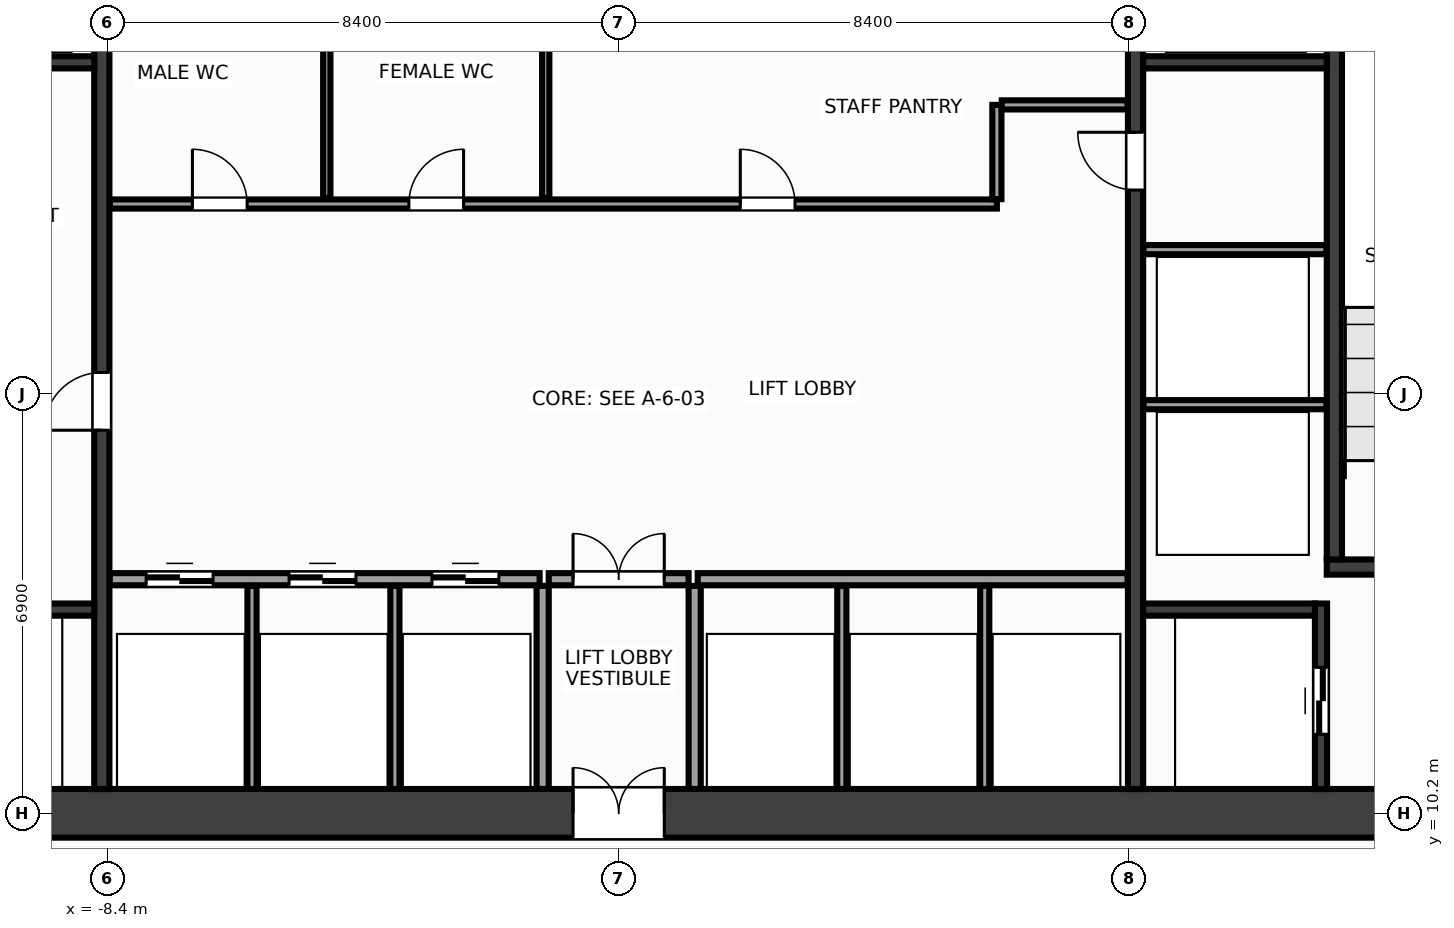
"""IFC4 building model, lengths in metres.
Left out: names, types, materials, properties, quantities, classifications, styles, units other than length and angle.
Written with IfcOpenShell. Run it as: python <this file> out.ifc"""

import sys

from ifc_helpers import new_model, si_unit, direction, frame, frame_2d, origin, place, context, subcontext, project, spatial, rectangle, extrude, source, transform, mapped, element, fill, save


model = new_model("IFC4")
c1 = context("Model", 3, precision=1e-05, world=origin(), true_north=direction((0.0, 1.0)))
c2 = subcontext(c1, "Body", "Model", "MODEL_VIEW")
j1 = project(units=[si_unit("LENGTHUNIT", "METRE"), si_unit("PLANEANGLEUNIT", "RADIAN")], contexts=[c1])
p1 = place(None, origin())
s1 = spatial("IfcSite", under=j1, at=p1, CompositionType="ELEMENT")
p2 = place(p1, origin())
s2 = spatial("IfcBuilding", under=s1, at=p2, CompositionType="ELEMENT")
p3 = place(p2, frame((0.0, 0.0, 27.2)))
s3 = spatial("IfcBuildingStorey", under=s2, at=p3, CompositionType="ELEMENT", Elevation=27.2)
m1 = source(origin(), c2, "Body", "SweptSolid", [
    extrude(rectangle(XDim=32.0, YDim=0.8, at=frame_2d((16.0, 0.0))), origin(), (0.0, 0.0, 1.0), 3.6),
])
p4 = place(p3, frame((-16.0, 10.2, 0.0), z_axis=(0.0, 0.0, 1.0), x_axis=(1.0, 0.0, 0.0)))
e1 = element("IfcWall", 1, at=p4, inside=s3, PredefinedType="SHEAR", context=c2, shape_type="MappedRepresentation", body=[
    mapped(m1, transform((0.0, 0.0, 0.0), x_axis=(1.0, 0.0, 0.0), y_axis=(0.0, 1.0, 0.0), z_axis=(0.0, 0.0, 1.0), scale=1.0)),
])
p5 = place(p4, frame((1.85, 0.0, 0.0)))
e2 = element("IfcOpeningElement", 2, at=p5, cuts=e1, PredefinedType="OPENING", context=c2, shape_type="SweptSolid", body=[
    extrude(rectangle(XDim=1.6, YDim=2.15, at=frame_2d((0.8, 1.075))), frame((0.0, 0.412, 0.0), z_axis=(0.0, -1.0, 0.0), x_axis=(1.0, 0.0, 0.0)), (0.0, 0.0, 1.0), 0.824),
])
p6 = place(p4, frame((28.55, 0.0, 0.0)))
e3 = element("IfcOpeningElement", 3, at=p6, cuts=e1, PredefinedType="OPENING", context=c2, shape_type="SweptSolid", body=[
    extrude(rectangle(XDim=1.6, YDim=2.15, at=frame_2d((0.8, 1.075))), frame((0.0, 0.412, 0.0), z_axis=(0.0, -1.0, 0.0), x_axis=(1.0, 0.0, 0.0)), (0.0, 0.0, 1.0), 0.824),
])
p7 = place(p4, frame((15.25, 0.0, 0.0)))
e4 = element("IfcOpeningElement", 4, at=p7, cuts=e1, PredefinedType="OPENING", context=c2, shape_type="SweptSolid", body=[
    extrude(rectangle(XDim=1.5, YDim=2.2, at=frame_2d((0.75, 1.1))), frame((0.0, 0.412, 0.0), z_axis=(0.0, -1.0, 0.0), x_axis=(1.0, 0.0, 0.0)), (0.0, 0.0, 1.0), 0.824),
])
m2 = source(origin(), c2, "Body", "SweptSolid", [
    extrude(rectangle(XDim=12.8, YDim=0.25, at=frame_2d((6.4, 0.0))), origin(), (0.0, 0.0, 1.0), 3.6),
])
p8 = place(p3, frame((-8.5, 10.6, 0.0), z_axis=(0.0, 0.0, 1.0), x_axis=(0.0, 1.0, 0.0)))
e5 = element("IfcWall", 5, at=p8, inside=s3, PredefinedType="SHEAR", context=c2, shape_type="MappedRepresentation", body=[
    mapped(m2, transform((0.0, 0.0, 0.0), x_axis=(1.0, 0.0, 0.0), y_axis=(0.0, 1.0, 0.0), z_axis=(0.0, 0.0, 1.0), scale=1.0)),
])
p9 = place(p8, frame((5.9, 0.0, 0.0)))
e6 = element("IfcOpeningElement", 6, at=p9, cuts=e5, PredefinedType="OPENING", context=c2, shape_type="SweptSolid", body=[
    extrude(rectangle(XDim=0.95, YDim=2.15, at=frame_2d((0.475, 1.075))), frame((0.0, 0.137, 0.0), z_axis=(0.0, -1.0, 0.0), x_axis=(1.0, 0.0, 0.0)), (0.0, 0.0, 1.0), 0.274),
])
p10 = place(p3, frame((8.5, 10.6, 0.0), z_axis=(0.0, 0.0, 1.0), x_axis=(0.0, 1.0, 0.0)))
e7 = element("IfcWall", 7, at=p10, inside=s3, PredefinedType="SHEAR", context=c2, shape_type="MappedRepresentation", body=[
    mapped(m2, transform((0.0, 0.0, 0.0), x_axis=(1.0, 0.0, 0.0), y_axis=(0.0, 1.0, 0.0), z_axis=(0.0, 0.0, 1.0), scale=1.0)),
])
p11 = place(p10, frame((9.85, 0.0, 0.0)))
e8 = element("IfcOpeningElement", 8, at=p11, cuts=e7, PredefinedType="OPENING", context=c2, shape_type="SweptSolid", body=[
    extrude(rectangle(XDim=0.95, YDim=2.15, at=frame_2d((0.475, 1.075))), frame((0.0, 0.137, 0.0), z_axis=(0.0, -1.0, 0.0), x_axis=(1.0, 0.0, 0.0)), (0.0, 0.0, 1.0), 0.274),
])
m3 = source(origin(), c2, "Body", "SweptSolid", [
    extrude(rectangle(XDim=3.555, YDim=0.25, at=frame_2d((1.777, 0.0))), origin(), (0.0, 0.0, 1.0), 3.6),
])
p12 = place(p3, frame((11.645, 14.25, 0.0), z_axis=(0.0, 0.0, 1.0), x_axis=(1.0, 0.0, 0.0)))
e9 = element("IfcWall", 9, at=p12, inside=s3, PredefinedType="SHEAR", context=c2, shape_type="MappedRepresentation", body=[
    mapped(m3, transform((0.0, 0.0, 0.0), x_axis=(1.0, 0.0, 0.0), y_axis=(0.0, 1.0, 0.0), z_axis=(0.0, 0.0, 1.0), scale=1.0)),
])
p13 = place(p12, frame((0.95, 0.0, 0.0)))
e10 = element("IfcOpeningElement", 10, at=p13, cuts=e9, PredefinedType="OPENING", context=c2, shape_type="SweptSolid", body=[
    extrude(rectangle(XDim=1.6, YDim=2.15, at=frame_2d((0.8, 1.075))), frame((0.0, 0.137, 0.0), z_axis=(0.0, -1.0, 0.0), x_axis=(1.0, 0.0, 0.0)), (0.0, 0.0, 1.0), 0.274),
])
m4 = source(origin(), c2, "Body", "SweptSolid", [
    extrude(rectangle(XDim=9.025, YDim=0.25, at=frame_2d((4.512, 0.0))), origin(), (0.0, 0.0, 1.0), 3.6),
])
p14 = place(p3, frame((11.77, 14.375, 0.0), z_axis=(0.0, 0.0, 1.0), x_axis=(0.0, 1.0, 0.0)))
e11 = element("IfcWall", 11, at=p14, inside=s3, PredefinedType="SHEAR", context=c2, shape_type="MappedRepresentation", body=[
    mapped(m4, transform((0.0, 0.0, 0.0), x_axis=(1.0, 0.0, 0.0), y_axis=(0.0, 1.0, 0.0), z_axis=(0.0, 0.0, 1.0), scale=1.0)),
])
m5 = source(origin(), c2, "Body", "SweptSolid", [
    extrude(rectangle(XDim=2.825, YDim=0.2, at=frame_2d((1.413, 0.0))), origin(), (0.0, 0.0, 1.0), 3.6),
])
p15 = place(p3, frame((-11.45, 13.55, 0.0), z_axis=(0.0, 0.0, 1.0), x_axis=(1.0, 0.0, 0.0)))
e12 = element("IfcWall", 12, at=p15, inside=s3, PredefinedType="SHEAR", context=c2, shape_type="MappedRepresentation", body=[
    mapped(m5, transform((0.0, 0.0, 0.0), x_axis=(1.0, 0.0, 0.0), y_axis=(0.0, 1.0, 0.0), z_axis=(0.0, 0.0, 1.0), scale=1.0)),
])
m6 = source(origin(), c2, "Body", "SweptSolid", [
    extrude(rectangle(XDim=3.05, YDim=0.2, at=frame_2d((1.525, 0.0))), origin(), (0.0, 0.0, 1.0), 3.6),
])
p16 = place(p3, frame((11.55, 10.6, 0.0), z_axis=(0.0, 0.0, 1.0), x_axis=(0.0, 1.0, 0.0)))
e13 = element("IfcWall", 13, at=p16, inside=s3, PredefinedType="SHEAR", context=c2, shape_type="MappedRepresentation", body=[
    mapped(m6, transform((0.0, 0.0, 0.0), x_axis=(1.0, 0.0, 0.0), y_axis=(0.0, 1.0, 0.0), z_axis=(0.0, 0.0, 1.0), scale=1.0)),
])
p17 = place(p16, frame((0.9, 0.0, 0.0)))
e14 = element("IfcOpeningElement", 14, at=p17, cuts=e13, PredefinedType="OPENING", context=c2, shape_type="SweptSolid", body=[
    extrude(rectangle(XDim=1.1, YDim=2.15, at=frame_2d((0.55, 1.075))), frame((0.0, 0.112, 0.0), z_axis=(0.0, -1.0, 0.0), x_axis=(1.0, 0.0, 0.0)), (0.0, 0.0, 1.0), 0.224),
])
p18 = place(p3, frame((8.625, 13.55, 0.0), z_axis=(0.0, 0.0, 1.0), x_axis=(1.0, 0.0, 0.0)))
e15 = element("IfcWall", 15, at=p18, inside=s3, PredefinedType="SHEAR", context=c2, shape_type="MappedRepresentation", body=[
    mapped(m5, transform((0.0, 0.0, 0.0), x_axis=(1.0, 0.0, 0.0), y_axis=(0.0, 1.0, 0.0), z_axis=(0.0, 0.0, 1.0), scale=1.0)),
])
m7 = source(origin(), c2, "Body", "SweptSolid", [
    extrude(rectangle(XDim=3.02, YDim=0.2, at=frame_2d((1.51, 0.0))), origin(), (0.0, 0.0, 1.0), 3.6),
])
for number, where, z_axis, x_axis in (
    (16, (-11.645, 22.55, 0.0), (0.0, 0.0, 1.0), (1.0, 0.0, 0.0)),
    (17, (8.625, 22.55, 0.0), (0.0, 0.0, 1.0), (1.0, 0.0, 0.0)),
):
    element("IfcWall", number, at=place(p3, frame(where, z_axis=z_axis, x_axis=x_axis)), inside=s3, PredefinedType="SHEAR", context=c2, shape_type="MappedRepresentation", body=[
        mapped(m7, transform((0.0, 0.0, 0.0), x_axis=(1.0, 0.0, 0.0), y_axis=(0.0, 1.0, 0.0), z_axis=(0.0, 0.0, 1.0), scale=1.0)),
    ])
m8 = source(origin(), c2, "Body", "SweptSolid", [
    extrude(rectangle(XDim=3.01, YDim=0.15, at=frame_2d((1.505, 0.0))), origin(), (0.0, 0.0, 1.0), 3.36),
])
for number, where, z_axis, x_axis in (
    (18, (8.63, 16.92, 0.0), (0.0, 0.0, 1.0), (1.0, 0.0, 0.0)),
    (19, (8.63, 19.47, 0.0), (0.0, 0.0, 1.0), (1.0, 0.0, 0.0)),
):
    element("IfcWall", number, at=place(p3, frame(where, z_axis=z_axis, x_axis=x_axis)), inside=s3, PredefinedType="PARTITIONING", context=c2, shape_type="MappedRepresentation", body=[
        mapped(m8, transform((0.0, 0.0, 0.0), x_axis=(1.0, 0.0, 0.0), y_axis=(0.0, 1.0, 0.0), z_axis=(0.0, 0.0, 1.0), scale=1.0)),
    ])
m9 = source(origin(), c2, "Body", "SweptSolid", [
    extrude(rectangle(XDim=7.07, YDim=0.2, at=frame_2d((3.535, 0.0))), origin(), (0.0, 0.0, 1.0), 3.36),
])
p19 = place(p3, frame((-8.37, 14.05, 0.0), z_axis=(0.0, 0.0, 1.0), x_axis=(1.0, 0.0, 0.0)))
e20 = element("IfcWall", 20, at=p19, inside=s3, PredefinedType="PARTITIONING", context=c2, shape_type="MappedRepresentation", body=[
    mapped(m9, transform((0.0, 0.0, 0.0), x_axis=(1.0, 0.0, 0.0), y_axis=(0.0, 1.0, 0.0), z_axis=(0.0, 0.0, 1.0), scale=1.0)),
])
p20 = place(p19, frame((0.6, 0.0, 0.0)))
e21 = element("IfcOpeningElement", 21, at=p20, cuts=e20, PredefinedType="OPENING", context=c2, shape_type="SweptSolid", body=[
    extrude(rectangle(XDim=1.1, YDim=2.15, at=frame_2d((0.55, 1.075))), frame((0.0, 0.112, 0.0), z_axis=(0.0, -1.0, 0.0), x_axis=(1.0, 0.0, 0.0)), (0.0, 0.0, 1.0), 0.224),
])
p21 = place(p19, frame((2.95, 0.0, 0.0)))
e22 = element("IfcOpeningElement", 22, at=p21, cuts=e20, PredefinedType="OPENING", context=c2, shape_type="SweptSolid", body=[
    extrude(rectangle(XDim=1.1, YDim=2.15, at=frame_2d((0.55, 1.075))), frame((0.0, 0.112, 0.0), z_axis=(0.0, -1.0, 0.0), x_axis=(1.0, 0.0, 0.0)), (0.0, 0.0, 1.0), 0.224),
])
p22 = place(p19, frame((5.3, 0.0, 0.0)))
e23 = element("IfcOpeningElement", 23, at=p22, cuts=e20, PredefinedType="OPENING", context=c2, shape_type="SweptSolid", body=[
    extrude(rectangle(XDim=1.1, YDim=2.15, at=frame_2d((0.55, 1.075))), frame((0.0, 0.112, 0.0), z_axis=(0.0, -1.0, 0.0), x_axis=(1.0, 0.0, 0.0)), (0.0, 0.0, 1.0), 0.224),
])
p23 = place(p3, frame((1.3, 14.05, 0.0), z_axis=(0.0, 0.0, 1.0), x_axis=(1.0, 0.0, 0.0)))
e24 = element("IfcWall", 24, at=p23, inside=s3, PredefinedType="PARTITIONING", context=c2, shape_type="MappedRepresentation", body=[
    mapped(m9, transform((0.0, 0.0, 0.0), x_axis=(1.0, 0.0, 0.0), y_axis=(0.0, 1.0, 0.0), z_axis=(0.0, 0.0, 1.0), scale=1.0)),
])
m10 = source(origin(), c2, "Body", "SweptSolid", [
    extrude(rectangle(XDim=3.34, YDim=0.2, at=frame_2d((1.67, 0.0))), origin(), (0.0, 0.0, 1.0), 3.36),
])
for number, where, z_axis, x_axis in (
    (25, (-1.25, 10.6, 0.0), (0.0, 0.0, 1.0), (0.0, 1.0, 0.0)),
    (26, (1.25, 10.6, 0.0), (0.0, 0.0, 1.0), (0.0, 1.0, 0.0)),
):
    element("IfcWall", number, at=place(p3, frame(where, z_axis=z_axis, x_axis=x_axis)), inside=s3, PredefinedType="PARTITIONING", context=c2, shape_type="MappedRepresentation", body=[
        mapped(m10, transform((0.0, 0.0, 0.0), x_axis=(1.0, 0.0, 0.0), y_axis=(0.0, 1.0, 0.0), z_axis=(0.0, 0.0, 1.0), scale=1.0)),
    ])
m11 = source(origin(), c2, "Body", "SweptSolid", [
    extrude(rectangle(XDim=2.3, YDim=0.2, at=frame_2d((1.15, 0.0))), origin(), (0.0, 0.0, 1.0), 3.36),
])
p24 = place(p3, frame((-1.15, 14.05, 0.0), z_axis=(0.0, 0.0, 1.0), x_axis=(1.0, 0.0, 0.0)))
e27 = element("IfcWall", 27, at=p24, inside=s3, PredefinedType="PARTITIONING", context=c2, shape_type="MappedRepresentation", body=[
    mapped(m11, transform((0.0, 0.0, 0.0), x_axis=(1.0, 0.0, 0.0), y_axis=(0.0, 1.0, 0.0), z_axis=(0.0, 0.0, 1.0), scale=1.0)),
])
p25 = place(p24, frame((0.4, 0.0, 0.0)))
e28 = element("IfcOpeningElement", 28, at=p25, cuts=e27, PredefinedType="OPENING", context=c2, shape_type="SweptSolid", body=[
    extrude(rectangle(XDim=1.5, YDim=2.2, at=frame_2d((0.75, 1.1))), frame((0.0, 0.112, 0.0), z_axis=(0.0, -1.0, 0.0), x_axis=(1.0, 0.0, 0.0)), (0.0, 0.0, 1.0), 0.224),
])
m12 = source(origin(), c2, "Body", "SweptSolid", [
    extrude(rectangle(XDim=14.59, YDim=0.15, at=frame_2d((7.295, 0.0))), origin(), (0.0, 0.0, 1.0), 3.36),
])
p26 = place(p3, frame((-8.37, 20.22, 0.0), z_axis=(0.0, 0.0, 1.0), x_axis=(1.0, 0.0, 0.0)))
e29 = element("IfcWall", 29, at=p26, inside=s3, PredefinedType="PARTITIONING", context=c2, shape_type="MappedRepresentation", body=[
    mapped(m12, transform((0.0, 0.0, 0.0), x_axis=(1.0, 0.0, 0.0), y_axis=(0.0, 1.0, 0.0), z_axis=(0.0, 0.0, 1.0), scale=1.0)),
])
p27 = place(p26, frame((1.36, 0.0, 0.0)))
e30 = element("IfcOpeningElement", 30, at=p27, cuts=e29, PredefinedType="OPENING", context=c2, shape_type="SweptSolid", body=[
    extrude(rectangle(XDim=0.9, YDim=2.15, at=frame_2d((0.45, 1.075))), frame((0.0, 0.087, 0.0), z_axis=(0.0, -1.0, 0.0), x_axis=(1.0, 0.0, 0.0)), (0.0, 0.0, 1.0), 0.174),
])
p28 = place(p26, frame((4.92, 0.0, 0.0)))
e31 = element("IfcOpeningElement", 31, at=p28, cuts=e29, PredefinedType="OPENING", context=c2, shape_type="SweptSolid", body=[
    extrude(rectangle(XDim=0.9, YDim=2.15, at=frame_2d((0.45, 1.075))), frame((0.0, 0.087, 0.0), z_axis=(0.0, -1.0, 0.0), x_axis=(1.0, 0.0, 0.0)), (0.0, 0.0, 1.0), 0.174),
])
p29 = place(p26, frame((10.37, 0.0, 0.0)))
e32 = element("IfcOpeningElement", 32, at=p29, cuts=e29, PredefinedType="OPENING", context=c2, shape_type="SweptSolid", body=[
    extrude(rectangle(XDim=0.9, YDim=2.15, at=frame_2d((0.45, 1.075))), frame((0.0, 0.087, 0.0), z_axis=(0.0, -1.0, 0.0), x_axis=(1.0, 0.0, 0.0)), (0.0, 0.0, 1.0), 0.174),
])
m13 = source(origin(), c2, "Body", "SweptSolid", [
    extrude(rectangle(XDim=1.55, YDim=0.15, at=frame_2d((0.775, 0.0))), origin(), (0.0, 0.0, 1.0), 3.36),
])
p30 = place(p3, frame((6.22, 20.3, 0.0), z_axis=(0.0, 0.0, 1.0), x_axis=(0.0, 1.0, 0.0)))
e33 = element("IfcWall", 33, at=p30, inside=s3, PredefinedType="PARTITIONING", context=c2, shape_type="MappedRepresentation", body=[
    mapped(m13, transform((0.0, 0.0, 0.0), x_axis=(1.0, 0.0, 0.0), y_axis=(0.0, 1.0, 0.0), z_axis=(0.0, 0.0, 1.0), scale=1.0)),
])
m14 = source(origin(), c2, "Body", "SweptSolid", [
    extrude(rectangle(XDim=2.07, YDim=0.15, at=frame_2d((1.035, 0.0))), origin(), (0.0, 0.0, 1.0), 3.36),
])
p31 = place(p3, frame((6.3, 21.85, 0.0), z_axis=(0.0, 0.0, 1.0), x_axis=(1.0, 0.0, 0.0)))
e34 = element("IfcWall", 34, at=p31, inside=s3, PredefinedType="PARTITIONING", context=c2, shape_type="MappedRepresentation", body=[
    mapped(m14, transform((0.0, 0.0, 0.0), x_axis=(1.0, 0.0, 0.0), y_axis=(0.0, 1.0, 0.0), z_axis=(0.0, 0.0, 1.0), scale=1.0)),
])
m15 = source(origin(), c2, "Body", "SweptSolid", [
    extrude(rectangle(XDim=3.34, YDim=0.15, at=frame_2d((1.67, 0.0))), origin(), (0.0, 0.0, 1.0), 3.36),
])
for number, where, z_axis, x_axis in (
    (35, (-6.03, 10.6, 0.0), (0.0, 0.0, 1.0), (0.0, 1.0, 0.0)),
    (36, (-3.68, 10.6, 0.0), (0.0, 0.0, 1.0), (0.0, 1.0, 0.0)),
    (37, (3.67, 10.6, 0.0), (0.0, 0.0, 1.0), (0.0, 1.0, 0.0)),
    (38, (6.02, 10.6, 0.0), (0.0, 0.0, 1.0), (0.0, 1.0, 0.0)),
):
    element("IfcWall", number, at=place(p3, frame(where, z_axis=z_axis, x_axis=x_axis)), inside=s3, PredefinedType="PARTITIONING", context=c2, shape_type="MappedRepresentation", body=[
        mapped(m15, transform((0.0, 0.0, 0.0), x_axis=(1.0, 0.0, 0.0), y_axis=(0.0, 1.0, 0.0), z_axis=(0.0, 0.0, 1.0), scale=1.0)),
    ])
m16 = source(origin(), c2, "Body", "SweptSolid", [
    extrude(rectangle(XDim=3.04, YDim=0.12, at=frame_2d((1.52, 0.0))), origin(), (0.0, 0.0, 1.0), 3.36),
])
for number, where, z_axis, x_axis in (
    (39, (-4.8, 20.32, 0.0), (0.0, 0.0, 1.0), (0.0, 1.0, 0.0)),
    (40, (-1.2, 20.32, 0.0), (0.0, 0.0, 1.0), (0.0, 1.0, 0.0)),
):
    element("IfcWall", number, at=place(p3, frame(where, z_axis=z_axis, x_axis=x_axis)), inside=s3, PredefinedType="PARTITIONING", context=c2, shape_type="MappedRepresentation", body=[
        mapped(m16, transform((0.0, 0.0, 0.0), x_axis=(1.0, 0.0, 0.0), y_axis=(0.0, 1.0, 0.0), z_axis=(0.0, 0.0, 1.0), scale=1.0)),
    ])
m17 = source(origin(), c2, "Body", "SweptSolid", [
    extrude(rectangle(XDim=1.1, YDim=2.15, at=frame_2d((0.55, 1.075))), frame((0.0, 0.025, 0.0), z_axis=(0.0, -1.0, 0.0), x_axis=(1.0, 0.0, 0.0)), (0.0, 0.0, 1.0), 0.05),
])
p32 = place(p17, origin())
e41 = element("IfcDoor", 41, at=p32, inside=s3, OperationType="DOUBLE_DOOR_SLIDING", PredefinedType="DOOR", context=c2, shape_type="MappedRepresentation", body=[
    mapped(m17, transform((0.0, 0.0, 0.0), x_axis=(1.0, 0.0, 0.0), y_axis=(0.0, 1.0, 0.0), z_axis=(0.0, 0.0, 1.0), scale=1.0)),
])
fill(e14, e41)
m18 = source(origin(), c2, "Body", "SweptSolid", [
    extrude(rectangle(XDim=0.95, YDim=2.15, at=frame_2d((0.475, 1.075))), frame((0.0, 0.025, 0.0), z_axis=(0.0, -1.0, 0.0), x_axis=(1.0, 0.0, 0.0)), (0.0, 0.0, 1.0), 0.05),
])
p33 = place(p9, origin())
e42 = element("IfcDoor", 42, at=p33, inside=s3, OperationType="SINGLE_SWING_LEFT", PredefinedType="DOOR", context=c2, shape_type="MappedRepresentation", body=[
    mapped(m18, transform((0.0, 0.0, 0.0), x_axis=(1.0, 0.0, 0.0), y_axis=(0.0, 1.0, 0.0), z_axis=(0.0, 0.0, 1.0), scale=1.0)),
])
fill(e6, e42)
m19 = source(origin(), c2, "Body", "SweptSolid", [
    extrude(rectangle(XDim=0.95, YDim=2.15, at=frame_2d((0.475, 1.075))), frame((0.0, 0.025, 0.0), z_axis=(0.0, -1.0, 0.0), x_axis=(1.0, 0.0, 0.0)), (0.0, 0.0, 1.0), 0.05),
])
p34 = place(p11, origin())
e43 = element("IfcDoor", 43, at=p34, inside=s3, OperationType="SINGLE_SWING_RIGHT", PredefinedType="DOOR", context=c2, shape_type="MappedRepresentation", body=[
    mapped(m19, transform((0.0, 0.0, 0.0), x_axis=(1.0, 0.0, 0.0), y_axis=(0.0, 1.0, 0.0), z_axis=(0.0, 0.0, 1.0), scale=1.0)),
])
fill(e8, e43)
p35 = place(p20, origin())
e44 = element("IfcDoor", 44, at=p35, inside=s3, OperationType="DOUBLE_DOOR_SLIDING", PredefinedType="DOOR", context=c2, shape_type="MappedRepresentation", body=[
    mapped(m17, transform((0.0, 0.0, 0.0), x_axis=(1.0, 0.0, 0.0), y_axis=(0.0, 1.0, 0.0), z_axis=(0.0, 0.0, 1.0), scale=1.0)),
])
fill(e21, e44)
p36 = place(p21, origin())
e45 = element("IfcDoor", 45, at=p36, inside=s3, OperationType="DOUBLE_DOOR_SLIDING", PredefinedType="DOOR", context=c2, shape_type="MappedRepresentation", body=[
    mapped(m17, transform((0.0, 0.0, 0.0), x_axis=(1.0, 0.0, 0.0), y_axis=(0.0, 1.0, 0.0), z_axis=(0.0, 0.0, 1.0), scale=1.0)),
])
fill(e22, e45)
p37 = place(p22, origin())
e46 = element("IfcDoor", 46, at=p37, inside=s3, OperationType="DOUBLE_DOOR_SLIDING", PredefinedType="DOOR", context=c2, shape_type="MappedRepresentation", body=[
    mapped(m17, transform((0.0, 0.0, 0.0), x_axis=(1.0, 0.0, 0.0), y_axis=(0.0, 1.0, 0.0), z_axis=(0.0, 0.0, 1.0), scale=1.0)),
])
fill(e23, e46)
m20 = source(origin(), c2, "Body", "SweptSolid", [
    extrude(rectangle(XDim=1.5, YDim=2.2, at=frame_2d((0.75, 1.1))), frame((0.0, 0.025, 0.0), z_axis=(0.0, -1.0, 0.0), x_axis=(1.0, 0.0, 0.0)), (0.0, 0.0, 1.0), 0.05),
])
p38 = place(p25, origin())
e47 = element("IfcDoor", 47, at=p38, inside=s3, OperationType="DOUBLE_DOOR_SINGLE_SWING", PredefinedType="DOOR", context=c2, shape_type="MappedRepresentation", body=[
    mapped(m20, transform((0.0, 0.0, 0.0), x_axis=(1.0, 0.0, 0.0), y_axis=(0.0, 1.0, 0.0), z_axis=(0.0, 0.0, 1.0), scale=1.0)),
])
fill(e28, e47)
p39 = place(p7, origin())
e48 = element("IfcDoor", 48, at=p39, inside=s3, OperationType="DOUBLE_DOOR_SINGLE_SWING", PredefinedType="DOOR", context=c2, shape_type="MappedRepresentation", body=[
    mapped(m20, transform((0.0, 0.0, 0.0), x_axis=(1.0, 0.0, 0.0), y_axis=(0.0, 1.0, 0.0), z_axis=(0.0, 0.0, 1.0), scale=1.0)),
])
fill(e4, e48)
m21 = source(origin(), c2, "Body", "SweptSolid", [
    extrude(rectangle(XDim=0.9, YDim=2.15, at=frame_2d((0.45, 1.075))), frame((0.0, 0.025, 0.0), z_axis=(0.0, -1.0, 0.0), x_axis=(1.0, 0.0, 0.0)), (0.0, 0.0, 1.0), 0.05),
])
p40 = place(p27, origin())
e49 = element("IfcDoor", 49, at=p40, inside=s3, OperationType="SINGLE_SWING_LEFT", PredefinedType="DOOR", context=c2, shape_type="MappedRepresentation", body=[
    mapped(m21, transform((0.0, 0.0, 0.0), x_axis=(1.0, 0.0, 0.0), y_axis=(0.0, 1.0, 0.0), z_axis=(0.0, 0.0, 1.0), scale=1.0)),
])
fill(e30, e49)
p41 = place(p28, origin())
e50 = element("IfcDoor", 50, at=p41, inside=s3, OperationType="SINGLE_SWING_RIGHT", PredefinedType="DOOR", context=c2, shape_type="MappedRepresentation", body=[
    mapped(m21, transform((0.0, 0.0, 0.0), x_axis=(1.0, 0.0, 0.0), y_axis=(0.0, 1.0, 0.0), z_axis=(0.0, 0.0, 1.0), scale=1.0)),
])
fill(e31, e50)
p42 = place(p29, origin())
e51 = element("IfcDoor", 51, at=p42, inside=s3, OperationType="SINGLE_SWING_LEFT", PredefinedType="DOOR", context=c2, shape_type="MappedRepresentation", body=[
    mapped(m21, transform((0.0, 0.0, 0.0), x_axis=(1.0, 0.0, 0.0), y_axis=(0.0, 1.0, 0.0), z_axis=(0.0, 0.0, 1.0), scale=1.0)),
])
fill(e32, e51)
save(model, sys.argv[1])
